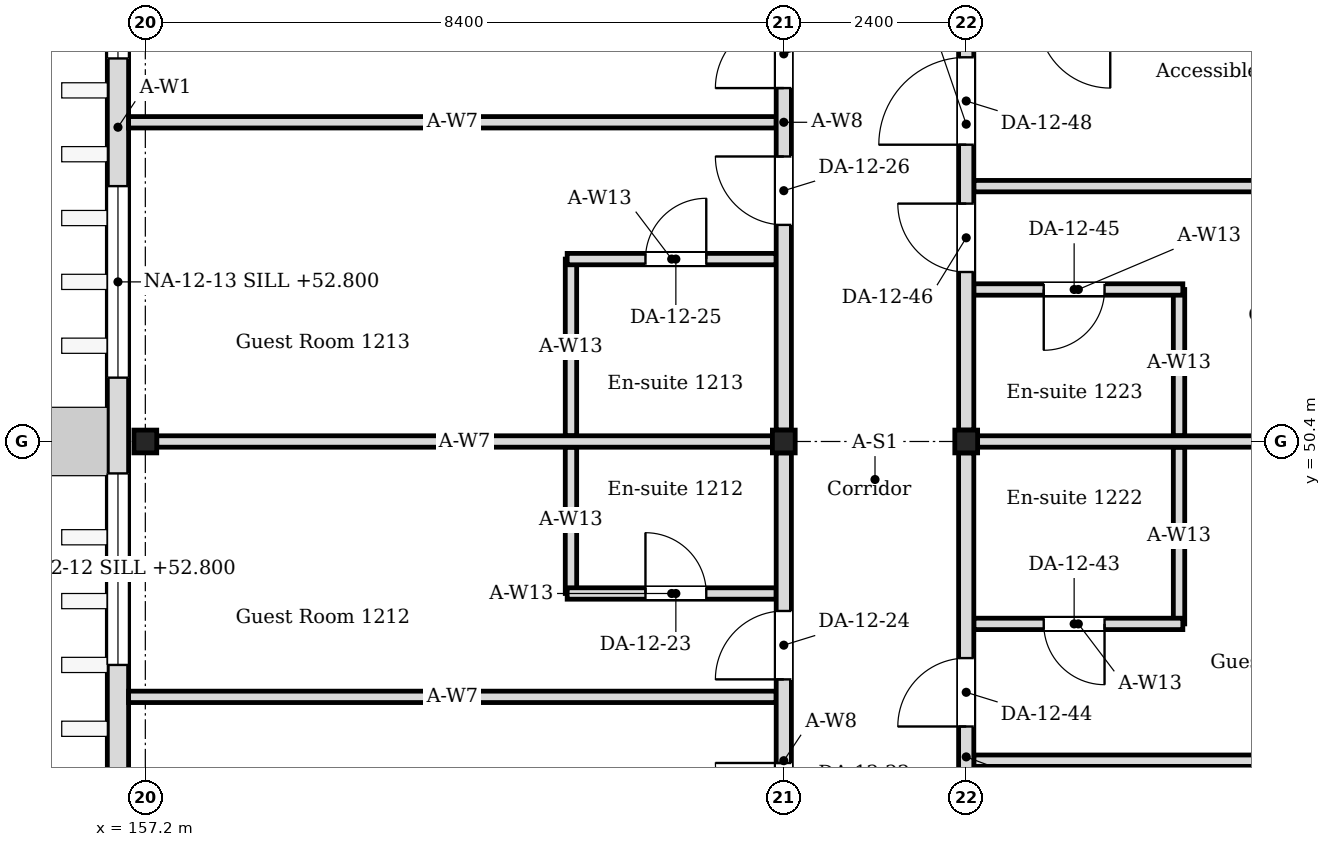
"""IFC4 building model, lengths in metres.
Left out: names, types, materials, properties, quantities, classifications, styles, units other than length and angle.
Written with IfcOpenShell. Run it as: python <this file> out.ifc"""

import sys

from ifc_helpers import new_model, si_unit, direction, frame, frame_2d, origin, origin_2d, place, context, subcontext, project, spatial, rectangle, i_section, extrude, element, fill, save


model = new_model("IFC4")
c1 = context("Model", 3, precision=1e-05, world=origin(), true_north=direction((0.0, 1.0)))
c2 = subcontext(c1, "Body", "Model", "MODEL_VIEW")
j1 = project(units=[si_unit("LENGTHUNIT", "METRE"), si_unit("PLANEANGLEUNIT", "RADIAN")], contexts=[c1])
p1 = place(None, origin())
s1 = spatial("IfcSite", under=j1, at=p1, CompositionType="ELEMENT")
p2 = place(p1, origin())
s2 = spatial("IfcBuilding", under=s1, at=p2, CompositionType="ELEMENT")
p3 = place(p2, frame((0.0, 0.0, 52.2)))
s3 = spatial("IfcBuildingStorey", under=s2, at=p3, CompositionType="ELEMENT", Elevation=52.2)
for number, where, z_axis, x_axis in (
    (1, (157.2, 50.4, 0.0), (0.0, 0.0, 1.0), (1.0, 0.0, 0.0)),
    (2, (165.6, 50.4, 0.0), (0.0, 0.0, 1.0), (1.0, 0.0, 0.0)),
    (3, (168.0, 50.4, 0.0), (0.0, 0.0, 1.0), (1.0, 0.0, 0.0)),
):
    element("IfcColumn", number, at=place(p3, frame(where, z_axis=z_axis, x_axis=x_axis)), inside=s3, PredefinedType="COLUMN", context=c2, shape_type="SweptSolid", body=[
        extrude(i_section(OverallWidth=0.3, OverallDepth=0.3, WebThickness=0.01, FlangeThickness=0.015, FilletRadius=0.013, at=origin_2d()), origin(), (0.0, 0.0, 1.0), 4.2),
    ])
p4 = place(p3, frame((156.84, 41.65, 0.0), z_axis=(0.0, 0.0, 1.0), x_axis=(0.0, 1.0, 0.0)))
e4 = element("IfcWall", 4, at=p4, inside=s3, PredefinedType="SOLIDWALL", context=c2, shape_type="SweptSolid", body=[
    extrude(rectangle(XDim=25.77, YDim=0.28, at=frame_2d((12.885, 0.0))), origin(), (0.0, 0.0, 1.0), 4.05),
])
p5 = place(p4, frame((1.61, 0.0, 0.6)))
e5 = element("IfcOpeningElement", 5, at=p5, cuts=e4, PredefinedType="OPENING", context=c2, shape_type="SweptSolid", body=[
    extrude(rectangle(XDim=2.52, YDim=2.4, at=frame_2d((1.26, 1.2))), frame((0.0, 0.15, 0.0), z_axis=(0.0, -1.0, 0.0), x_axis=(1.0, 0.0, 0.0)), (0.0, 0.0, 1.0), 0.3),
])
p6 = place(p4, frame((5.81, 0.0, 0.6)))
e6 = element("IfcOpeningElement", 6, at=p6, cuts=e4, PredefinedType="OPENING", context=c2, shape_type="SweptSolid", body=[
    extrude(rectangle(XDim=2.52, YDim=2.4, at=frame_2d((1.26, 1.2))), frame((0.0, 0.15, 0.0), z_axis=(0.0, -1.0, 0.0), x_axis=(1.0, 0.0, 0.0)), (0.0, 0.0, 1.0), 0.3),
])
p7 = place(p4, frame((9.59, 0.0, 0.6)))
e7 = element("IfcOpeningElement", 7, at=p7, cuts=e4, PredefinedType="OPENING", context=c2, shape_type="SweptSolid", body=[
    extrude(rectangle(XDim=2.52, YDim=2.4, at=frame_2d((1.26, 1.2))), frame((0.0, 0.15, 0.0), z_axis=(0.0, -1.0, 0.0), x_axis=(1.0, 0.0, 0.0)), (0.0, 0.0, 1.0), 0.3),
])
p8 = place(p4, frame((13.79, 0.0, 0.6)))
e8 = element("IfcOpeningElement", 8, at=p8, cuts=e4, PredefinedType="OPENING", context=c2, shape_type="SweptSolid", body=[
    extrude(rectangle(XDim=2.52, YDim=2.4, at=frame_2d((1.26, 1.2))), frame((0.0, 0.15, 0.0), z_axis=(0.0, -1.0, 0.0), x_axis=(1.0, 0.0, 0.0)), (0.0, 0.0, 1.0), 0.3),
])
p9 = place(p4, frame((18.41, 0.0, 0.6)))
e9 = element("IfcOpeningElement", 9, at=p9, cuts=e4, PredefinedType="OPENING", context=c2, shape_type="SweptSolid", body=[
    extrude(rectangle(XDim=2.52, YDim=2.4, at=frame_2d((1.26, 1.2))), frame((0.0, 0.15, 0.0), z_axis=(0.0, -1.0, 0.0), x_axis=(1.0, 0.0, 0.0)), (0.0, 0.0, 1.0), 0.3),
])
p10 = place(p4, frame((22.61, 0.0, 0.6)))
e10 = element("IfcOpeningElement", 10, at=p10, cuts=e4, PredefinedType="OPENING", context=c2, shape_type="SweptSolid", body=[
    extrude(rectangle(XDim=2.52, YDim=2.4, at=frame_2d((1.26, 1.2))), frame((0.0, 0.15, 0.0), z_axis=(0.0, -1.0, 0.0), x_axis=(1.0, 0.0, 0.0)), (0.0, 0.0, 1.0), 0.3),
])
p11 = place(p3, frame((162.8, 48.4, 0.0), z_axis=(0.0, 0.0, 1.0), x_axis=(0.0, 1.0, 0.0)))
e11 = element("IfcWall", 11, at=p11, inside=s3, PredefinedType="PARTITIONING", context=c2, shape_type="SweptSolid", body=[
    extrude(rectangle(XDim=1.925, YDim=0.15, at=frame_2d((0.962, 0.0))), origin(), (0.0, 0.0, 1.0), 4.05),
])
p12 = place(p3, frame((162.75, 48.4, 0.0), z_axis=(0.0, 0.0, 1.0), x_axis=(1.0, 0.0, 0.0)))
e12 = element("IfcWall", 12, at=p12, inside=s3, PredefinedType="PARTITIONING", context=c2, shape_type="SweptSolid", body=[
    extrude(rectangle(XDim=2.75, YDim=0.15, at=frame_2d((1.375, 0.0))), origin(), (0.0, 0.0, 1.0), 4.05),
])
p13 = place(p12, frame((1.03, 0.0, 0.0)))
e13 = element("IfcOpeningElement", 13, at=p13, cuts=e12, PredefinedType="OPENING", context=c2, shape_type="SweptSolid", body=[
    extrude(rectangle(XDim=0.8, YDim=2.1, at=frame_2d((0.4, 1.05))), frame((0.0, 0.085, 0.0), z_axis=(0.0, -1.0, 0.0), x_axis=(1.0, 0.0, 0.0)), (0.0, 0.0, 1.0), 0.17),
])
p14 = place(p3, frame((162.8, 50.475, 0.0), z_axis=(0.0, 0.0, 1.0), x_axis=(0.0, 1.0, 0.0)))
e14 = element("IfcWall", 14, at=p14, inside=s3, PredefinedType="PARTITIONING", context=c2, shape_type="SweptSolid", body=[
    extrude(rectangle(XDim=2.325, YDim=0.15, at=frame_2d((1.163, 0.0))), origin(), (0.0, 0.0, 1.0), 4.05),
])
p15 = place(p3, frame((162.75, 52.8, 0.0), z_axis=(0.0, 0.0, 1.0), x_axis=(1.0, 0.0, 0.0)))
e15 = element("IfcWall", 15, at=p15, inside=s3, PredefinedType="PARTITIONING", context=c2, shape_type="SweptSolid", body=[
    extrude(rectangle(XDim=2.75, YDim=0.15, at=frame_2d((1.375, 0.0))), origin(), (0.0, 0.0, 1.0), 4.05),
])
p16 = place(p15, frame((1.03, 0.0, 0.0)))
e16 = element("IfcOpeningElement", 16, at=p16, cuts=e15, PredefinedType="OPENING", context=c2, shape_type="SweptSolid", body=[
    extrude(rectangle(XDim=0.8, YDim=2.1, at=frame_2d((0.4, 1.05))), frame((0.0, 0.085, 0.0), z_axis=(0.0, -1.0, 0.0), x_axis=(1.0, 0.0, 0.0)), (0.0, 0.0, 1.0), 0.17),
])
p17 = place(p3, frame((170.8, 48.0, 0.0), z_axis=(0.0, 0.0, 1.0), x_axis=(0.0, 1.0, 0.0)))
e17 = element("IfcWall", 17, at=p17, inside=s3, PredefinedType="PARTITIONING", context=c2, shape_type="SweptSolid", body=[
    extrude(rectangle(XDim=2.325, YDim=0.15, at=frame_2d((1.163, 0.0))), origin(), (0.0, 0.0, 1.0), 4.05),
])
p18 = place(p3, frame((170.85, 48.0, 0.0), z_axis=(0.0, 0.0, 1.0), x_axis=(-1.0, 0.0, 0.0)))
e18 = element("IfcWall", 18, at=p18, inside=s3, PredefinedType="PARTITIONING", context=c2, shape_type="SweptSolid", body=[
    extrude(rectangle(XDim=2.75, YDim=0.15, at=frame_2d((1.375, 0.0))), origin(), (0.0, 0.0, 1.0), 4.05),
])
p19 = place(p18, frame((1.03, 0.0, 0.0)))
e19 = element("IfcOpeningElement", 19, at=p19, cuts=e18, PredefinedType="OPENING", context=c2, shape_type="SweptSolid", body=[
    extrude(rectangle(XDim=0.8, YDim=2.1, at=frame_2d((0.4, 1.05))), frame((0.0, 0.085, 0.0), z_axis=(0.0, -1.0, 0.0), x_axis=(1.0, 0.0, 0.0)), (0.0, 0.0, 1.0), 0.17),
])
p20 = place(p3, frame((170.8, 50.475, 0.0), z_axis=(0.0, 0.0, 1.0), x_axis=(0.0, 1.0, 0.0)))
e20 = element("IfcWall", 20, at=p20, inside=s3, PredefinedType="PARTITIONING", context=c2, shape_type="SweptSolid", body=[
    extrude(rectangle(XDim=1.925, YDim=0.15, at=frame_2d((0.962, 0.0))), origin(), (0.0, 0.0, 1.0), 4.05),
])
p21 = place(p3, frame((170.85, 52.4, 0.0), z_axis=(0.0, 0.0, 1.0), x_axis=(-1.0, 0.0, 0.0)))
e21 = element("IfcWall", 21, at=p21, inside=s3, PredefinedType="PARTITIONING", context=c2, shape_type="SweptSolid", body=[
    extrude(rectangle(XDim=2.75, YDim=0.15, at=frame_2d((1.375, 0.0))), origin(), (0.0, 0.0, 1.0), 4.05),
])
p22 = place(p21, frame((1.03, 0.0, 0.0)))
e22 = element("IfcOpeningElement", 22, at=p22, cuts=e21, PredefinedType="OPENING", context=c2, shape_type="SweptSolid", body=[
    extrude(rectangle(XDim=0.8, YDim=2.1, at=frame_2d((0.4, 1.05))), frame((0.0, 0.085, 0.0), z_axis=(0.0, -1.0, 0.0), x_axis=(1.0, 0.0, 0.0)), (0.0, 0.0, 1.0), 0.17),
])
p23 = place(p3, frame((157.35, 50.4, 0.0), z_axis=(0.0, 0.0, 1.0), x_axis=(1.0, 0.0, 0.0)))
e23 = element("IfcWall", 23, at=p23, inside=s3, PredefinedType="PARTITIONING", context=c2, shape_type="SweptSolid", body=[
    extrude(rectangle(XDim=8.1, YDim=0.15, at=frame_2d((4.05, 0.0))), origin(), (0.0, 0.0, 1.0), 3.604),
])
p24 = place(p3, frame((168.15, 50.4, 0.0), z_axis=(0.0, 0.0, 1.0), x_axis=(1.0, 0.0, 0.0)))
e24 = element("IfcWall", 24, at=p24, inside=s3, PredefinedType="PARTITIONING", context=c2, shape_type="SweptSolid", body=[
    extrude(rectangle(XDim=8.1, YDim=0.15, at=frame_2d((4.05, 0.0))), origin(), (0.0, 0.0, 1.0), 3.604),
])
for number, where, z_axis, x_axis in (
    (25, (156.98, 47.04, 0.0), (0.0, 0.0, 1.0), (1.0, 0.0, 0.0)),
    (26, (156.98, 54.6, 0.0), (0.0, 0.0, 1.0), (1.0, 0.0, 0.0)),
    (27, (168.1, 46.2, 0.0), (0.0, 0.0, 1.0), (1.0, 0.0, 0.0)),
    (28, (168.1, 53.76, 0.0), (0.0, 0.0, 1.0), (1.0, 0.0, 0.0)),
):
    element("IfcWall", number, at=place(p3, frame(where, z_axis=z_axis, x_axis=x_axis)), inside=s3, PredefinedType="PARTITIONING", context=c2, shape_type="SweptSolid", body=[
        extrude(rectangle(XDim=8.52, YDim=0.15, at=frame_2d((4.26, 0.0))), origin(), (0.0, 0.0, 1.0), 3.604),
    ])
p25 = place(p3, frame((165.6, 42.15, 0.0), z_axis=(0.0, 0.0, 1.0), x_axis=(0.0, 1.0, 0.0)))
e29 = element("IfcWall", 29, at=p25, inside=s3, PredefinedType="PARTITIONING", context=c2, shape_type="SweptSolid", body=[
    extrude(rectangle(XDim=8.1, YDim=0.2, at=frame_2d((4.05, 0.0))), origin(), (0.0, 0.0, 1.0), 3.45),
])
p26 = place(p25, frame((3.12, 0.0, 0.0)))
e30 = element("IfcOpeningElement", 30, at=p26, cuts=e29, PredefinedType="OPENING", context=c2, shape_type="SweptSolid", body=[
    extrude(rectangle(XDim=0.9, YDim=2.1, at=frame_2d((0.45, 1.05))), frame((0.0, 0.11, 0.0), z_axis=(0.0, -1.0, 0.0), x_axis=(1.0, 0.0, 0.0)), (0.0, 0.0, 1.0), 0.22),
])
p27 = place(p25, frame((5.12, 0.0, 0.0)))
e31 = element("IfcOpeningElement", 31, at=p27, cuts=e29, PredefinedType="OPENING", context=c2, shape_type="SweptSolid", body=[
    extrude(rectangle(XDim=0.9, YDim=2.1, at=frame_2d((0.45, 1.05))), frame((0.0, 0.11, 0.0), z_axis=(0.0, -1.0, 0.0), x_axis=(1.0, 0.0, 0.0)), (0.0, 0.0, 1.0), 0.22),
])
p28 = place(p3, frame((165.6, 50.55, 0.0), z_axis=(0.0, 0.0, 1.0), x_axis=(0.0, 1.0, 0.0)))
e32 = element("IfcWall", 32, at=p28, inside=s3, PredefinedType="PARTITIONING", context=c2, shape_type="SweptSolid", body=[
    extrude(rectangle(XDim=8.1, YDim=0.2, at=frame_2d((4.05, 0.0))), origin(), (0.0, 0.0, 1.0), 3.45),
])
p29 = place(p28, frame((2.7, 0.0, 0.0)))
e33 = element("IfcOpeningElement", 33, at=p29, cuts=e32, PredefinedType="OPENING", context=c2, shape_type="SweptSolid", body=[
    extrude(rectangle(XDim=0.9, YDim=2.1, at=frame_2d((0.45, 1.05))), frame((0.0, 0.11, 0.0), z_axis=(0.0, -1.0, 0.0), x_axis=(1.0, 0.0, 0.0)), (0.0, 0.0, 1.0), 0.22),
])
p30 = place(p28, frame((4.5, 0.0, 0.0)))
e34 = element("IfcOpeningElement", 34, at=p30, cuts=e32, PredefinedType="OPENING", context=c2, shape_type="SweptSolid", body=[
    extrude(rectangle(XDim=0.9, YDim=2.1, at=frame_2d((0.45, 1.05))), frame((0.0, 0.11, 0.0), z_axis=(0.0, -1.0, 0.0), x_axis=(1.0, 0.0, 0.0)), (0.0, 0.0, 1.0), 0.22),
])
p31 = place(p3, frame((168.0, 42.25, 0.0), z_axis=(0.0, 0.0, 1.0), x_axis=(0.0, 1.0, 0.0)))
e35 = element("IfcWall", 35, at=p31, inside=s3, PredefinedType="PARTITIONING", context=c2, shape_type="SweptSolid", body=[
    extrude(rectangle(XDim=8.0, YDim=0.2, at=frame_2d((4.0, 0.0))), origin(), (0.0, 0.0, 1.0), 3.45),
])
p32 = place(p31, frame((2.6, 0.0, 0.0)))
e36 = element("IfcOpeningElement", 36, at=p32, cuts=e35, PredefinedType="OPENING", context=c2, shape_type="SweptSolid", body=[
    extrude(rectangle(XDim=0.9, YDim=2.1, at=frame_2d((0.45, 1.05))), frame((0.0, 0.11, 0.0), z_axis=(0.0, -1.0, 0.0), x_axis=(1.0, 0.0, 0.0)), (0.0, 0.0, 1.0), 0.22),
])
p33 = place(p31, frame((4.4, 0.0, 0.0)))
e37 = element("IfcOpeningElement", 37, at=p33, cuts=e35, PredefinedType="OPENING", context=c2, shape_type="SweptSolid", body=[
    extrude(rectangle(XDim=0.9, YDim=2.1, at=frame_2d((0.45, 1.05))), frame((0.0, 0.11, 0.0), z_axis=(0.0, -1.0, 0.0), x_axis=(1.0, 0.0, 0.0)), (0.0, 0.0, 1.0), 0.22),
])
p34 = place(p3, frame((168.0, 50.55, 0.0), z_axis=(0.0, 0.0, 1.0), x_axis=(0.0, 1.0, 0.0)))
e38 = element("IfcWall", 38, at=p34, inside=s3, PredefinedType="PARTITIONING", context=c2, shape_type="SweptSolid", body=[
    extrude(rectangle(XDim=8.05, YDim=0.2, at=frame_2d((4.025, 0.0))), origin(), (0.0, 0.0, 1.0), 3.45),
])
p35 = place(p34, frame((2.08, 0.0, 0.0)))
e39 = element("IfcOpeningElement", 39, at=p35, cuts=e38, PredefinedType="OPENING", context=c2, shape_type="SweptSolid", body=[
    extrude(rectangle(XDim=0.9, YDim=2.1, at=frame_2d((0.45, 1.05))), frame((0.0, 0.11, 0.0), z_axis=(0.0, -1.0, 0.0), x_axis=(1.0, 0.0, 0.0)), (0.0, 0.0, 1.0), 0.22),
])
p36 = place(p34, frame((3.755, 0.0, 0.0)))
e40 = element("IfcOpeningElement", 40, at=p36, cuts=e38, PredefinedType="OPENING", context=c2, shape_type="SweptSolid", body=[
    extrude(rectangle(XDim=1.15, YDim=2.1, at=frame_2d((0.575, 1.05))), frame((0.0, 0.11, 0.0), z_axis=(0.0, -1.0, 0.0), x_axis=(1.0, 0.0, 0.0)), (0.0, 0.0, 1.0), 0.22),
])
p37 = place(p6, origin())
e41 = element("IfcWindow", 41, at=p37, inside=s3, PartitioningType="SINGLE_PANEL", PredefinedType="WINDOW", context=c2, shape_type="SweptSolid", body=[
    extrude(rectangle(XDim=2.52, YDim=2.4, at=frame_2d((1.26, 1.2))), frame((0.0, 0.03, 0.0), z_axis=(0.0, -1.0, 0.0), x_axis=(1.0, 0.0, 0.0)), (0.0, 0.0, 1.0), 0.06),
])
fill(e6, e41)
p38 = place(p7, origin())
e42 = element("IfcWindow", 42, at=p38, inside=s3, PartitioningType="SINGLE_PANEL", PredefinedType="WINDOW", context=c2, shape_type="SweptSolid", body=[
    extrude(rectangle(XDim=2.52, YDim=2.4, at=frame_2d((1.26, 1.2))), frame((0.0, 0.03, 0.0), z_axis=(0.0, -1.0, 0.0), x_axis=(1.0, 0.0, 0.0)), (0.0, 0.0, 1.0), 0.06),
])
fill(e7, e42)
p39 = place(p8, origin())
e43 = element("IfcWindow", 43, at=p39, inside=s3, PartitioningType="SINGLE_PANEL", PredefinedType="WINDOW", context=c2, shape_type="SweptSolid", body=[
    extrude(rectangle(XDim=2.52, YDim=2.4, at=frame_2d((1.26, 1.2))), frame((0.0, 0.03, 0.0), z_axis=(0.0, -1.0, 0.0), x_axis=(1.0, 0.0, 0.0)), (0.0, 0.0, 1.0), 0.06),
])
fill(e8, e43)
p40 = place(p26, origin())
e44 = element("IfcDoor", 44, at=p40, inside=s3, OperationType="SINGLE_SWING_RIGHT", PredefinedType="DOOR", context=c2, shape_type="SweptSolid", body=[
    extrude(rectangle(XDim=0.9, YDim=2.1, at=frame_2d((0.45, 1.05))), frame((0.0, 0.025, 0.0), z_axis=(0.0, -1.0, 0.0), x_axis=(1.0, 0.0, 0.0)), (0.0, 0.0, 1.0), 0.05),
])
fill(e30, e44)
p41 = place(p13, origin())
e45 = element("IfcDoor", 45, at=p41, inside=s3, OperationType="SINGLE_SWING_LEFT", PredefinedType="DOOR", context=c2, shape_type="SweptSolid", body=[
    extrude(rectangle(XDim=0.8, YDim=2.1, at=frame_2d((0.4, 1.05))), frame((0.0, 0.025, 0.0), z_axis=(0.0, -1.0, 0.0), x_axis=(1.0, 0.0, 0.0)), (0.0, 0.0, 1.0), 0.05),
])
fill(e13, e45)
p42 = place(p27, origin())
e46 = element("IfcDoor", 46, at=p42, inside=s3, OperationType="SINGLE_SWING_LEFT", PredefinedType="DOOR", context=c2, shape_type="SweptSolid", body=[
    extrude(rectangle(XDim=0.9, YDim=2.1, at=frame_2d((0.45, 1.05))), frame((0.0, 0.025, 0.0), z_axis=(0.0, -1.0, 0.0), x_axis=(1.0, 0.0, 0.0)), (0.0, 0.0, 1.0), 0.05),
])
fill(e31, e46)
p43 = place(p16, origin())
e47 = element("IfcDoor", 47, at=p43, inside=s3, OperationType="SINGLE_SWING_RIGHT", PredefinedType="DOOR", context=c2, shape_type="SweptSolid", body=[
    extrude(rectangle(XDim=0.8, YDim=2.1, at=frame_2d((0.4, 1.05))), frame((0.0, 0.025, 0.0), z_axis=(0.0, -1.0, 0.0), x_axis=(1.0, 0.0, 0.0)), (0.0, 0.0, 1.0), 0.05),
])
fill(e16, e47)
p44 = place(p29, origin())
e48 = element("IfcDoor", 48, at=p44, inside=s3, OperationType="SINGLE_SWING_RIGHT", PredefinedType="DOOR", context=c2, shape_type="SweptSolid", body=[
    extrude(rectangle(XDim=0.9, YDim=2.1, at=frame_2d((0.45, 1.05))), frame((0.0, 0.025, 0.0), z_axis=(0.0, -1.0, 0.0), x_axis=(1.0, 0.0, 0.0)), (0.0, 0.0, 1.0), 0.05),
])
fill(e33, e48)
p45 = place(p30, origin())
e49 = element("IfcDoor", 49, at=p45, inside=s3, OperationType="SINGLE_SWING_LEFT", PredefinedType="DOOR", context=c2, shape_type="SweptSolid", body=[
    extrude(rectangle(XDim=0.9, YDim=2.1, at=frame_2d((0.45, 1.05))), frame((0.0, 0.025, 0.0), z_axis=(0.0, -1.0, 0.0), x_axis=(1.0, 0.0, 0.0)), (0.0, 0.0, 1.0), 0.05),
])
fill(e34, e49)
p46 = place(p19, origin())
e50 = element("IfcDoor", 50, at=p46, inside=s3, OperationType="SINGLE_SWING_LEFT", PredefinedType="DOOR", context=c2, shape_type="SweptSolid", body=[
    extrude(rectangle(XDim=0.8, YDim=2.1, at=frame_2d((0.4, 1.05))), frame((0.0, 0.025, 0.0), z_axis=(0.0, -1.0, 0.0), x_axis=(1.0, 0.0, 0.0)), (0.0, 0.0, 1.0), 0.05),
])
fill(e19, e50)
p47 = place(p33, origin())
e51 = element("IfcDoor", 51, at=p47, inside=s3, OperationType="SINGLE_SWING_LEFT", PredefinedType="DOOR", context=c2, shape_type="SweptSolid", body=[
    extrude(rectangle(XDim=0.9, YDim=2.1, at=frame_2d((0.45, 1.05))), frame((0.0, 0.025, 0.0), z_axis=(0.0, -1.0, 0.0), x_axis=(1.0, 0.0, 0.0)), (0.0, 0.0, 1.0), 0.05),
])
fill(e37, e51)
p48 = place(p22, origin())
e52 = element("IfcDoor", 52, at=p48, inside=s3, OperationType="SINGLE_SWING_RIGHT", PredefinedType="DOOR", context=c2, shape_type="SweptSolid", body=[
    extrude(rectangle(XDim=0.8, YDim=2.1, at=frame_2d((0.4, 1.05))), frame((0.0, 0.025, 0.0), z_axis=(0.0, -1.0, 0.0), x_axis=(1.0, 0.0, 0.0)), (0.0, 0.0, 1.0), 0.05),
])
fill(e22, e52)
p49 = place(p35, origin())
e53 = element("IfcDoor", 53, at=p49, inside=s3, OperationType="SINGLE_SWING_RIGHT", PredefinedType="DOOR", context=c2, shape_type="SweptSolid", body=[
    extrude(rectangle(XDim=0.9, YDim=2.1, at=frame_2d((0.45, 1.05))), frame((0.0, 0.025, 0.0), z_axis=(0.0, -1.0, 0.0), x_axis=(1.0, 0.0, 0.0)), (0.0, 0.0, 1.0), 0.05),
])
fill(e39, e53)
p50 = place(p36, origin())
e54 = element("IfcDoor", 54, at=p50, inside=s3, OperationType="SINGLE_SWING_LEFT", PredefinedType="DOOR", context=c2, shape_type="SweptSolid", body=[
    extrude(rectangle(XDim=1.15, YDim=2.1, at=frame_2d((0.575, 1.05))), frame((0.0, 0.025, 0.0), z_axis=(0.0, -1.0, 0.0), x_axis=(1.0, 0.0, 0.0)), (0.0, 0.0, 1.0), 0.05),
])
fill(e40, e54)
save(model, sys.argv[1])
